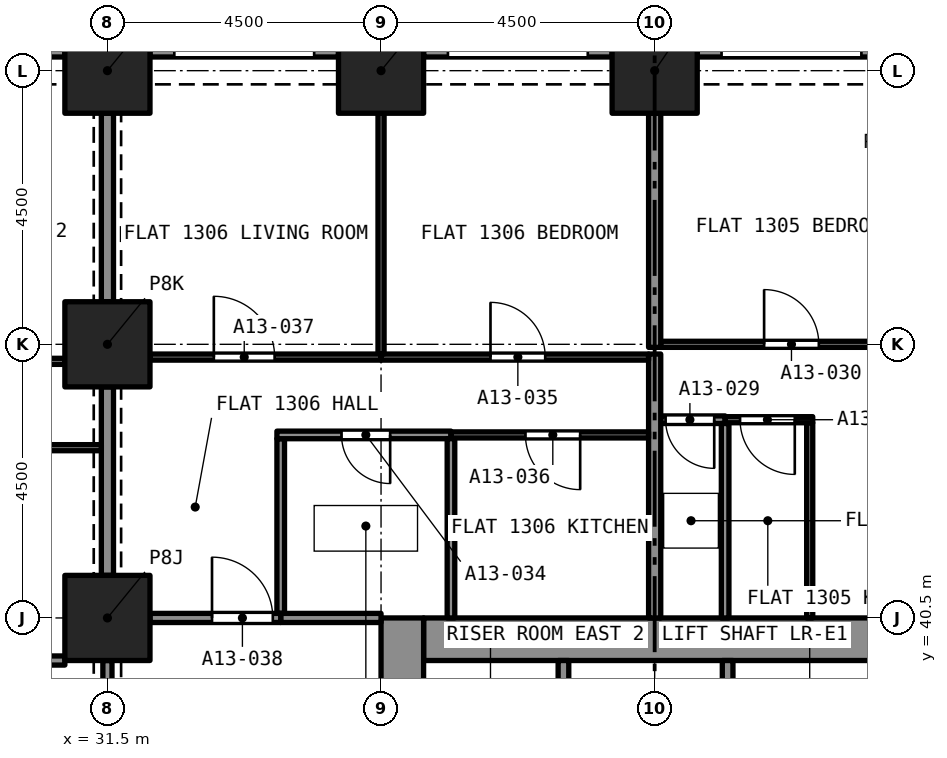
"""IFC4 building model, lengths in metres.
Left out: names, types, materials, properties, quantities, classifications, styles, units other than length and angle.
Written with IfcOpenShell. Run it as: python <this file> out.ifc"""

import sys

from ifc_helpers import new_model, si_unit, direction, frame, frame_2d, origin, origin_2d, place, context, subcontext, project, spatial, rectangle, extrude, element, fill, save


model = new_model("IFC4")
c1 = context("Model", 3, precision=1e-05, world=origin(), true_north=direction((0.0, 1.0)))
c2 = subcontext(c1, "Body", "Model", "MODEL_VIEW")
j1 = project(units=[si_unit("LENGTHUNIT", "METRE"), si_unit("PLANEANGLEUNIT", "RADIAN")], contexts=[c1])
p1 = place(None, origin())
s1 = spatial("IfcSite", under=j1, at=p1, CompositionType="ELEMENT")
p2 = place(p1, origin())
s2 = spatial("IfcBuilding", under=s1, at=p2, CompositionType="ELEMENT")
p3 = place(p2, frame((0.0, 0.0, 52.8)))
s3 = spatial("IfcBuildingStorey", under=s2, at=p3, CompositionType="ELEMENT", Elevation=52.8)
for number, where, z_axis, x_axis in (
    (1, (31.5, 40.5, 0.0), (0.0, 0.0, 1.0), (1.0, 0.0, 0.0)),
    (2, (31.5, 45.0, 0.0), (0.0, 0.0, 1.0), (1.0, 0.0, 0.0)),
    (3, (31.5, 49.5, 0.0), (0.0, 0.0, 1.0), (1.0, 0.0, 0.0)),
    (4, (36.0, 49.5, 0.0), (0.0, 0.0, 1.0), (1.0, 0.0, 0.0)),
    (5, (40.5, 49.5, 0.0), (0.0, 0.0, 1.0), (1.0, 0.0, 0.0)),
):
    element("IfcColumn", number, at=place(p3, frame(where, z_axis=z_axis, x_axis=x_axis)), inside=s3, PredefinedType="COLUMN", context=c2, shape_type="SweptSolid", body=[
        extrude(rectangle(XDim=1.4, YDim=1.4, at=origin_2d()), origin(), (0.0, 0.0, 1.0), 3.2),
    ])
p4 = place(p3, frame((36.7, 40.15, 0.0), z_axis=(0.0, 0.0, 1.0), x_axis=(1.0, 0.0, 0.0)))
e6 = element("IfcWall", 6, at=p4, inside=s3, PredefinedType="SOLIDWALL", context=c2, shape_type="SweptSolid", body=[
    extrude(rectangle(XDim=7.6, YDim=0.7, at=frame_2d((3.8, 0.0))), origin(), (0.0, 0.0, 1.0), 3.2),
])
p5 = place(p3, frame((36.35, 27.0, 0.0), z_axis=(0.0, 0.0, 1.0), x_axis=(0.0, 1.0, 0.0)))
e7 = element("IfcWall", 7, at=p5, inside=s3, PredefinedType="SOLIDWALL", context=c2, shape_type="SweptSolid", body=[
    extrude(rectangle(XDim=13.5, YDim=0.7, at=frame_2d((6.75, 0.0))), origin(), (0.0, 0.0, 1.0), 3.2),
])
p6 = place(p5, frame((8.95, 0.0, 0.0)))
e8 = element("IfcOpeningElement", 8, at=p6, cuts=e7, PredefinedType="OPENING", context=c2, shape_type="SweptSolid", body=[
    extrude(rectangle(XDim=1.2, YDim=2.1, at=frame_2d((0.6, 1.05))), frame((0.0, 0.36, 0.0), z_axis=(0.0, -1.0, 0.0), x_axis=(1.0, 0.0, 0.0)), (0.0, 0.0, 1.0), 0.72),
])
p7 = place(p3, frame((41.2, 49.875, 0.0), z_axis=(0.0, 0.0, 1.0), x_axis=(1.0, 0.0, 0.0)))
e9 = element("IfcWall", 9, at=p7, inside=s3, PredefinedType="SOLIDWALL", context=c2, shape_type="SweptSolid", body=[
    extrude(rectangle(XDim=3.1, YDim=0.3, at=frame_2d((1.55, 0.0))), origin(), (0.0, 0.0, 1.0), 3.2),
])
p8 = place(p7, frame((0.4, 0.0, 0.45)))
e10 = element("IfcOpeningElement", 10, at=p8, cuts=e9, PredefinedType="OPENING", context=c2, shape_type="SweptSolid", body=[
    extrude(rectangle(XDim=2.3, YDim=1.95, at=frame_2d((1.15, 0.975))), frame((0.0, 0.16, 0.0), z_axis=(0.0, -1.0, 0.0), x_axis=(1.0, 0.0, 0.0)), (0.0, 0.0, 1.0), 0.32),
])
p9 = place(p3, frame((36.7, 49.875, 0.0), z_axis=(0.0, 0.0, 1.0), x_axis=(1.0, 0.0, 0.0)))
e11 = element("IfcWall", 11, at=p9, inside=s3, PredefinedType="SOLIDWALL", context=c2, shape_type="SweptSolid", body=[
    extrude(rectangle(XDim=3.1, YDim=0.3, at=frame_2d((1.55, 0.0))), origin(), (0.0, 0.0, 1.0), 3.2),
])
p10 = place(p9, frame((0.4, 0.0, 0.45)))
e12 = element("IfcOpeningElement", 12, at=p10, cuts=e11, PredefinedType="OPENING", context=c2, shape_type="SweptSolid", body=[
    extrude(rectangle(XDim=2.3, YDim=1.95, at=frame_2d((1.15, 0.975))), frame((0.0, 0.16, 0.0), z_axis=(0.0, -1.0, 0.0), x_axis=(1.0, 0.0, 0.0)), (0.0, 0.0, 1.0), 0.32),
])
p11 = place(p3, frame((32.2, 49.875, 0.0), z_axis=(0.0, 0.0, 1.0), x_axis=(1.0, 0.0, 0.0)))
e13 = element("IfcWall", 13, at=p11, inside=s3, PredefinedType="SOLIDWALL", context=c2, shape_type="SweptSolid", body=[
    extrude(rectangle(XDim=3.1, YDim=0.3, at=frame_2d((1.55, 0.0))), origin(), (0.0, 0.0, 1.0), 3.2),
])
p12 = place(p11, frame((0.4, 0.0, 0.45)))
e14 = element("IfcOpeningElement", 14, at=p12, cuts=e13, PredefinedType="OPENING", context=c2, shape_type="SweptSolid", body=[
    extrude(rectangle(XDim=2.3, YDim=1.95, at=frame_2d((1.15, 0.975))), frame((0.0, 0.16, 0.0), z_axis=(0.0, -1.0, 0.0), x_axis=(1.0, 0.0, 0.0)), (0.0, 0.0, 1.0), 0.32),
])
p13 = place(p3, frame((27.7, 49.875, 0.0), z_axis=(0.0, 0.0, 1.0), x_axis=(1.0, 0.0, 0.0)))
e15 = element("IfcWall", 15, at=p13, inside=s3, PredefinedType="SOLIDWALL", context=c2, shape_type="SweptSolid", body=[
    extrude(rectangle(XDim=3.1, YDim=0.3, at=frame_2d((1.55, 0.0))), origin(), (0.0, 0.0, 1.0), 3.2),
])
p14 = place(p13, frame((0.4, 0.0, 0.45)))
e16 = element("IfcOpeningElement", 16, at=p14, cuts=e15, PredefinedType="OPENING", context=c2, shape_type="SweptSolid", body=[
    extrude(rectangle(XDim=2.3, YDim=1.95, at=frame_2d((1.15, 0.975))), frame((0.0, 0.16, 0.0), z_axis=(0.0, -1.0, 0.0), x_axis=(1.0, 0.0, 0.0)), (0.0, 0.0, 1.0), 0.32),
])
p15 = place(p3, frame((41.659, 43.76, 0.0), z_axis=(0.0, 0.0, 1.0), x_axis=(-1.0, 0.0, 0.0)))
e17 = element("IfcWall", 17, at=p15, inside=s3, PredefinedType="PARTITIONING", context=c2, shape_type="SweptSolid", body=[
    extrude(rectangle(XDim=1.059, YDim=0.125, at=frame_2d((0.53, 0.0))), origin(), (0.0, 0.0, 1.0), 2.9),
])
p16 = place(p15, frame((0.179, 0.0, 0.0)))
e18 = element("IfcOpeningElement", 18, at=p16, cuts=e17, PredefinedType="OPENING", context=c2, shape_type="SweptSolid", body=[
    extrude(rectangle(XDim=0.8, YDim=2.1, at=frame_2d((0.4, 1.05))), frame((0.0, 0.073, 0.0), z_axis=(0.0, -1.0, 0.0), x_axis=(1.0, 0.0, 0.0)), (0.0, 0.0, 1.0), 0.145),
])
p17 = place(p3, frame((41.659, 40.5, 0.0), z_axis=(0.0, 0.0, 1.0), x_axis=(0.0, 1.0, 0.0)))
e19 = element("IfcWall", 19, at=p17, inside=s3, PredefinedType="PARTITIONING", context=c2, shape_type="SweptSolid", body=[
    extrude(rectangle(XDim=3.198, YDim=0.125, at=frame_2d((1.599, 0.0))), origin(), (0.0, 0.0, 1.0), 2.9),
])
p18 = place(p3, frame((40.5, 40.5, 0.0), z_axis=(0.0, 0.0, 1.0), x_axis=(0.0, 1.0, 0.0)))
e20 = element("IfcWall", 20, at=p18, inside=s3, PredefinedType="PARTITIONING", context=c2, shape_type="SweptSolid", body=[
    extrude(rectangle(XDim=4.34, YDim=0.2, at=frame_2d((2.17, 0.0))), origin(), (0.0, 0.0, 1.0), 2.9),
])
p19 = place(p3, frame((40.6, 45.0, 0.0), z_axis=(0.0, 0.0, 1.0), x_axis=(1.0, 0.0, 0.0)))
e21 = element("IfcWall", 21, at=p19, inside=s3, PredefinedType="PARTITIONING", context=c2, shape_type="SweptSolid", body=[
    extrude(rectangle(XDim=4.4, YDim=0.1, at=frame_2d((2.2, 0.0))), origin(), (0.0, 0.0, 1.0), 2.9),
])
p20 = place(p19, frame((1.7, 0.0, 0.0)))
e22 = element("IfcOpeningElement", 22, at=p20, cuts=e21, PredefinedType="OPENING", context=c2, shape_type="SweptSolid", body=[
    extrude(rectangle(XDim=0.9, YDim=2.1, at=frame_2d((0.45, 1.05))), frame((0.0, 0.06, 0.0), z_axis=(0.0, -1.0, 0.0), x_axis=(1.0, 0.0, 0.0)), (0.0, 0.0, 1.0), 0.12),
])
p21 = place(p3, frame((40.5, 44.95, 0.0), z_axis=(0.0, 0.0, 1.0), x_axis=(0.0, 1.0, 0.0)))
e23 = element("IfcWall", 23, at=p21, inside=s3, PredefinedType="PARTITIONING", context=c2, shape_type="SweptSolid", body=[
    extrude(rectangle(XDim=3.85, YDim=0.2, at=frame_2d((1.925, 0.0))), origin(), (0.0, 0.0, 1.0), 2.9),
])
p22 = place(p3, frame((43.05, 40.5, 0.0), z_axis=(0.0, 0.0, 1.0), x_axis=(0.0, 1.0, 0.0)))
e24 = element("IfcWall", 24, at=p22, inside=s3, PredefinedType="PARTITIONING", context=c2, shape_type="SweptSolid", body=[
    extrude(rectangle(XDim=3.21, YDim=0.1, at=frame_2d((1.605, 0.0))), origin(), (0.0, 0.0, 1.0), 2.9),
])
p23 = place(p3, frame((43.1, 43.76, 0.0), z_axis=(0.0, 0.0, 1.0), x_axis=(-1.0, 0.0, 0.0)))
e25 = element("IfcWall", 25, at=p23, inside=s3, PredefinedType="PARTITIONING", context=c2, shape_type="SweptSolid", body=[
    extrude(rectangle(XDim=1.441, YDim=0.1, at=frame_2d((0.72, 0.0))), origin(), (0.0, 0.0, 1.0), 2.9),
])
p24 = place(p23, frame((0.295, 0.0, 0.0)))
e26 = element("IfcOpeningElement", 26, at=p24, cuts=e25, PredefinedType="OPENING", context=c2, shape_type="SweptSolid", body=[
    extrude(rectangle(XDim=0.9, YDim=2.1, at=frame_2d((0.45, 1.05))), frame((0.0, 0.06, 0.0), z_axis=(0.0, -1.0, 0.0), x_axis=(1.0, 0.0, 0.0)), (0.0, 0.0, 1.0), 0.12),
])
p25 = place(p3, frame((34.35, 40.575, 0.0), z_axis=(0.0, 0.0, 1.0), x_axis=(0.0, 1.0, 0.0)))
e27 = element("IfcWall", 27, at=p25, inside=s3, PredefinedType="PARTITIONING", context=c2, shape_type="SweptSolid", body=[
    extrude(rectangle(XDim=2.873, YDim=0.125, at=frame_2d((1.436, 0.0))), origin(), (0.0, 0.0, 1.0), 2.9),
])
p26 = place(p3, frame((37.15, 43.51, 0.0), z_axis=(0.0, 0.0, 1.0), x_axis=(-1.0, 0.0, 0.0)))
e28 = element("IfcWall", 28, at=p26, inside=s3, PredefinedType="PARTITIONING", context=c2, shape_type="SweptSolid", body=[
    extrude(rectangle(XDim=2.862, YDim=0.125, at=frame_2d((1.431, 0.0))), origin(), (0.0, 0.0, 1.0), 2.9),
])
p27 = place(p26, frame((1.0, 0.0, 0.0)))
e29 = element("IfcOpeningElement", 29, at=p27, cuts=e28, PredefinedType="OPENING", context=c2, shape_type="SweptSolid", body=[
    extrude(rectangle(XDim=0.8, YDim=2.1, at=frame_2d((0.4, 1.05))), frame((0.0, 0.073, 0.0), z_axis=(0.0, -1.0, 0.0), x_axis=(1.0, 0.0, 0.0)), (0.0, 0.0, 1.0), 0.145),
])
p28 = place(p3, frame((37.15, 40.5, 0.0), z_axis=(0.0, 0.0, 1.0), x_axis=(0.0, 1.0, 0.0)))
e30 = element("IfcWall", 30, at=p28, inside=s3, PredefinedType="PARTITIONING", context=c2, shape_type="SweptSolid", body=[
    extrude(rectangle(XDim=2.948, YDim=0.125, at=frame_2d((1.474, 0.0))), origin(), (0.0, 0.0, 1.0), 2.9),
])
p29 = place(p3, frame((34.35, 40.5, 0.0), z_axis=(0.0, 0.0, 1.0), x_axis=(1.0, 0.0, 0.0)))
e31 = element("IfcWall", 31, at=p29, inside=s3, PredefinedType="PARTITIONING", context=c2, shape_type="SweptSolid", body=[
    extrude(rectangle(XDim=1.65, YDim=0.15, at=frame_2d((0.825, 0.0))), origin(), (0.0, 0.0, 1.0), 2.9),
])
p30 = place(p3, frame((36.0, 44.79, 0.0), z_axis=(0.0, 0.0, 1.0), x_axis=(1.0, 0.0, 0.0)))
e32 = element("IfcWall", 32, at=p30, inside=s3, PredefinedType="PARTITIONING", context=c2, shape_type="SweptSolid", body=[
    extrude(rectangle(XDim=4.4, YDim=0.1, at=frame_2d((2.2, 0.0))), origin(), (0.0, 0.0, 1.0), 2.9),
])
p31 = place(p30, frame((1.8, 0.0, 0.0)))
e33 = element("IfcOpeningElement", 33, at=p31, cuts=e32, PredefinedType="OPENING", context=c2, shape_type="SweptSolid", body=[
    extrude(rectangle(XDim=0.9, YDim=2.1, at=frame_2d((0.45, 1.05))), frame((0.0, 0.06, 0.0), z_axis=(0.0, -1.0, 0.0), x_axis=(1.0, 0.0, 0.0)), (0.0, 0.0, 1.0), 0.12),
])
p32 = place(p3, frame((36.0, 44.84, 0.0), z_axis=(0.0, 0.0, 1.0), x_axis=(0.0, 1.0, 0.0)))
e34 = element("IfcWall", 34, at=p32, inside=s3, PredefinedType="PARTITIONING", context=c2, shape_type="SweptSolid", body=[
    extrude(rectangle(XDim=3.96, YDim=0.1, at=frame_2d((1.98, 0.0))), origin(), (0.0, 0.0, 1.0), 2.9),
])
p33 = place(p3, frame((40.4, 43.51, 0.0), z_axis=(0.0, 0.0, 1.0), x_axis=(-1.0, 0.0, 0.0)))
e35 = element("IfcWall", 35, at=p33, inside=s3, PredefinedType="PARTITIONING", context=c2, shape_type="SweptSolid", body=[
    extrude(rectangle(XDim=3.25, YDim=0.1, at=frame_2d((1.625, 0.0))), origin(), (0.0, 0.0, 1.0), 2.9),
])
p34 = place(p33, frame((1.125, 0.0, 0.0)))
e36 = element("IfcOpeningElement", 36, at=p34, cuts=e35, PredefinedType="OPENING", context=c2, shape_type="SweptSolid", body=[
    extrude(rectangle(XDim=0.9, YDim=2.1, at=frame_2d((0.45, 1.05))), frame((0.0, 0.06, 0.0), z_axis=(0.0, -1.0, 0.0), x_axis=(1.0, 0.0, 0.0)), (0.0, 0.0, 1.0), 0.12),
])
p35 = place(p3, frame((32.2, 44.79, 0.0), z_axis=(0.0, 0.0, 1.0), x_axis=(1.0, 0.0, 0.0)))
e37 = element("IfcWall", 37, at=p35, inside=s3, PredefinedType="PARTITIONING", context=c2, shape_type="SweptSolid", body=[
    extrude(rectangle(XDim=3.8, YDim=0.1, at=frame_2d((1.9, 0.0))), origin(), (0.0, 0.0, 1.0), 2.9),
])
p36 = place(p35, frame((1.05, 0.0, 0.0)))
e38 = element("IfcOpeningElement", 38, at=p36, cuts=e37, PredefinedType="OPENING", context=c2, shape_type="SweptSolid", body=[
    extrude(rectangle(XDim=1.0, YDim=2.1, at=frame_2d((0.5, 1.05))), frame((0.0, 0.06, 0.0), z_axis=(0.0, -1.0, 0.0), x_axis=(1.0, 0.0, 0.0)), (0.0, 0.0, 1.0), 0.12),
])
p37 = place(p3, frame((31.5, 41.2, 0.0), z_axis=(0.0, 0.0, 1.0), x_axis=(0.0, 1.0, 0.0)))
e39 = element("IfcWall", 39, at=p37, inside=s3, PredefinedType="PARTITIONING", context=c2, shape_type="SweptSolid", body=[
    extrude(rectangle(XDim=3.1, YDim=0.2, at=frame_2d((1.55, 0.0))), origin(), (0.0, 0.0, 1.0), 2.38),
])
p38 = place(p3, frame((32.2, 40.5, 0.0), z_axis=(0.0, 0.0, 1.0), x_axis=(1.0, 0.0, 0.0)))
e40 = element("IfcWall", 40, at=p38, inside=s3, PredefinedType="PARTITIONING", context=c2, shape_type="SweptSolid", body=[
    extrude(rectangle(XDim=2.15, YDim=0.15, at=frame_2d((1.075, 0.0))), origin(), (0.0, 0.0, 1.0), 2.9),
])
p39 = place(p38, frame((1.02, 0.0, 0.0)))
e41 = element("IfcOpeningElement", 41, at=p39, cuts=e40, PredefinedType="OPENING", context=c2, shape_type="SweptSolid", body=[
    extrude(rectangle(XDim=1.0, YDim=2.1, at=frame_2d((0.5, 1.05))), frame((0.0, 0.085, 0.0), z_axis=(0.0, -1.0, 0.0), x_axis=(1.0, 0.0, 0.0)), (0.0, 0.0, 1.0), 0.17),
])
p40 = place(p3, frame((31.5, 45.7, 0.0), z_axis=(0.0, 0.0, 1.0), x_axis=(0.0, 1.0, 0.0)))
e42 = element("IfcWall", 42, at=p40, inside=s3, PredefinedType="PARTITIONING", context=c2, shape_type="SweptSolid", body=[
    extrude(rectangle(XDim=3.1, YDim=0.2, at=frame_2d((1.55, 0.0))), origin(), (0.0, 0.0, 1.0), 2.38),
])
p41 = place(p3, frame((27.0, 44.72, 0.0), z_axis=(0.0, 0.0, 1.0), x_axis=(1.0, 0.0, 0.0)))
e43 = element("IfcWall", 43, at=p41, inside=s3, PredefinedType="PARTITIONING", context=c2, shape_type="SweptSolid", body=[
    extrude(rectangle(XDim=3.8, YDim=0.1, at=frame_2d((1.9, 0.0))), origin(), (0.0, 0.0, 1.0), 2.75),
])
p42 = place(p41, frame((1.8, 0.0, 0.0)))
e44 = element("IfcOpeningElement", 44, at=p42, cuts=e43, PredefinedType="OPENING", context=c2, shape_type="SweptSolid", body=[
    extrude(rectangle(XDim=0.9, YDim=2.1, at=frame_2d((0.45, 1.05))), frame((0.0, 0.06, 0.0), z_axis=(0.0, -1.0, 0.0), x_axis=(1.0, 0.0, 0.0)), (0.0, 0.0, 1.0), 0.12),
])
p43 = place(p3, frame((31.4, 43.3, 0.0), z_axis=(0.0, 0.0, 1.0), x_axis=(-1.0, 0.0, 0.0)))
e45 = element("IfcWall", 45, at=p43, inside=s3, PredefinedType="PARTITIONING", context=c2, shape_type="SweptSolid", body=[
    extrude(rectangle(XDim=6.1, YDim=0.1, at=frame_2d((3.05, 0.0))), origin(), (0.0, 0.0, 1.0), 2.75),
])
p44 = place(p43, frame((2.525, 0.0, 0.0)))
e46 = element("IfcOpeningElement", 46, at=p44, cuts=e45, PredefinedType="OPENING", context=c2, shape_type="SweptSolid", body=[
    extrude(rectangle(XDim=0.9, YDim=2.1, at=frame_2d((0.45, 1.05))), frame((0.0, 0.06, 0.0), z_axis=(0.0, -1.0, 0.0), x_axis=(1.0, 0.0, 0.0)), (0.0, 0.0, 1.0), 0.12),
])
p45 = place(p3, frame((25.35, 39.8, 0.0), z_axis=(0.0, 0.0, 1.0), x_axis=(1.0, 0.0, 0.0)))
e47 = element("IfcWall", 47, at=p45, inside=s3, PredefinedType="PARTITIONING", context=c2, shape_type="SweptSolid", body=[
    extrude(rectangle(XDim=5.45, YDim=0.15, at=frame_2d((2.725, 0.0))), origin(), (0.0, 0.0, 1.0), 2.75),
])
p46 = place(p3, frame((31.5, 36.7, 0.0), z_axis=(0.0, 0.0, 1.0), x_axis=(0.0, 1.0, 0.0)))
e48 = element("IfcWall", 48, at=p46, inside=s3, PredefinedType="PARTITIONING", context=c2, shape_type="SweptSolid", body=[
    extrude(rectangle(XDim=3.1, YDim=0.15, at=frame_2d((1.55, 0.0))), origin(), (0.0, 0.0, 1.0), 2.38),
])
p47 = place(p46, frame((0.95, 0.0, 0.0)))
e49 = element("IfcOpeningElement", 49, at=p47, cuts=e48, PredefinedType="OPENING", context=c2, shape_type="SweptSolid", body=[
    extrude(rectangle(XDim=1.2, YDim=2.1, at=frame_2d((0.6, 1.05))), frame((0.0, 0.085, 0.0), z_axis=(0.0, -1.0, 0.0), x_axis=(1.0, 0.0, 0.0)), (0.0, 0.0, 1.0), 0.17),
])
for number, where, z_axis, x_axis in (
    (50, (41.7, 37.5, 0.0), (0.0, 0.0, 1.0), (0.0, 1.0, 0.0)),
    (51, (39.0, 37.5, 0.0), (0.0, 0.0, 1.0), (0.0, 1.0, 0.0)),
):
    element("IfcWall", number, at=place(p3, frame(where, z_axis=z_axis, x_axis=x_axis)), inside=s3, PredefinedType="SOLIDWALL", context=c2, shape_type="SweptSolid", body=[
        extrude(rectangle(XDim=2.3, YDim=0.175, at=frame_2d((1.15, 0.0))), origin(), (0.0, 0.0, 1.0), 2.9),
    ])
p48 = place(p16, origin())
e52 = element("IfcDoor", 52, at=p48, inside=s3, OperationType="SINGLE_SWING_RIGHT", PredefinedType="DOOR", context=c2, shape_type="SweptSolid", body=[
    extrude(rectangle(XDim=0.8, YDim=2.1, at=frame_2d((0.4, 1.05))), frame((0.0, 0.025, 0.0), z_axis=(0.0, -1.0, 0.0), x_axis=(1.0, 0.0, 0.0)), (0.0, 0.0, 1.0), 0.05),
])
fill(e18, e52)
p49 = place(p20, origin())
e53 = element("IfcDoor", 53, at=p49, inside=s3, OperationType="SINGLE_SWING_LEFT", PredefinedType="DOOR", context=c2, shape_type="SweptSolid", body=[
    extrude(rectangle(XDim=0.9, YDim=2.1, at=frame_2d((0.45, 1.05))), frame((0.0, 0.025, 0.0), z_axis=(0.0, -1.0, 0.0), x_axis=(1.0, 0.0, 0.0)), (0.0, 0.0, 1.0), 0.05),
])
fill(e22, e53)
p50 = place(p24, origin())
e54 = element("IfcDoor", 54, at=p50, inside=s3, OperationType="SINGLE_SWING_RIGHT", PredefinedType="DOOR", context=c2, shape_type="SweptSolid", body=[
    extrude(rectangle(XDim=0.9, YDim=2.1, at=frame_2d((0.45, 1.05))), frame((0.0, 0.025, 0.0), z_axis=(0.0, -1.0, 0.0), x_axis=(1.0, 0.0, 0.0)), (0.0, 0.0, 1.0), 0.05),
])
fill(e26, e54)
p51 = place(p27, origin())
e55 = element("IfcDoor", 55, at=p51, inside=s3, OperationType="SINGLE_SWING_LEFT", PredefinedType="DOOR", context=c2, shape_type="SweptSolid", body=[
    extrude(rectangle(XDim=0.8, YDim=2.1, at=frame_2d((0.4, 1.05))), frame((0.0, 0.025, 0.0), z_axis=(0.0, -1.0, 0.0), x_axis=(1.0, 0.0, 0.0)), (0.0, 0.0, 1.0), 0.05),
])
fill(e29, e55)
p52 = place(p31, origin())
e56 = element("IfcDoor", 56, at=p52, inside=s3, OperationType="SINGLE_SWING_RIGHT", PredefinedType="DOOR", context=c2, shape_type="SweptSolid", body=[
    extrude(rectangle(XDim=0.9, YDim=2.1, at=frame_2d((0.45, 1.05))), frame((0.0, 0.025, 0.0), z_axis=(0.0, -1.0, 0.0), x_axis=(1.0, 0.0, 0.0)), (0.0, 0.0, 1.0), 0.05),
])
fill(e33, e56)
p53 = place(p34, origin())
e57 = element("IfcDoor", 57, at=p53, inside=s3, OperationType="SINGLE_SWING_LEFT", PredefinedType="DOOR", context=c2, shape_type="SweptSolid", body=[
    extrude(rectangle(XDim=0.9, YDim=2.1, at=frame_2d((0.45, 1.05))), frame((0.0, 0.025, 0.0), z_axis=(0.0, -1.0, 0.0), x_axis=(1.0, 0.0, 0.0)), (0.0, 0.0, 1.0), 0.05),
])
fill(e36, e57)
p54 = place(p36, origin())
e58 = element("IfcDoor", 58, at=p54, inside=s3, OperationType="SINGLE_SWING_LEFT", PredefinedType="DOOR", context=c2, shape_type="SweptSolid", body=[
    extrude(rectangle(XDim=1.0, YDim=2.1, at=frame_2d((0.5, 1.05))), frame((0.0, 0.025, 0.0), z_axis=(0.0, -1.0, 0.0), x_axis=(1.0, 0.0, 0.0)), (0.0, 0.0, 1.0), 0.05),
])
fill(e38, e58)
p55 = place(p39, origin())
e59 = element("IfcDoor", 59, at=p55, inside=s3, OperationType="SINGLE_SWING_RIGHT", PredefinedType="DOOR", context=c2, shape_type="SweptSolid", body=[
    extrude(rectangle(XDim=1.0, YDim=2.1, at=frame_2d((0.5, 1.05))), frame((0.0, 0.025, 0.0), z_axis=(0.0, -1.0, 0.0), x_axis=(1.0, 0.0, 0.0)), (0.0, 0.0, 1.0), 0.05),
])
fill(e41, e59)
save(model, sys.argv[1])
